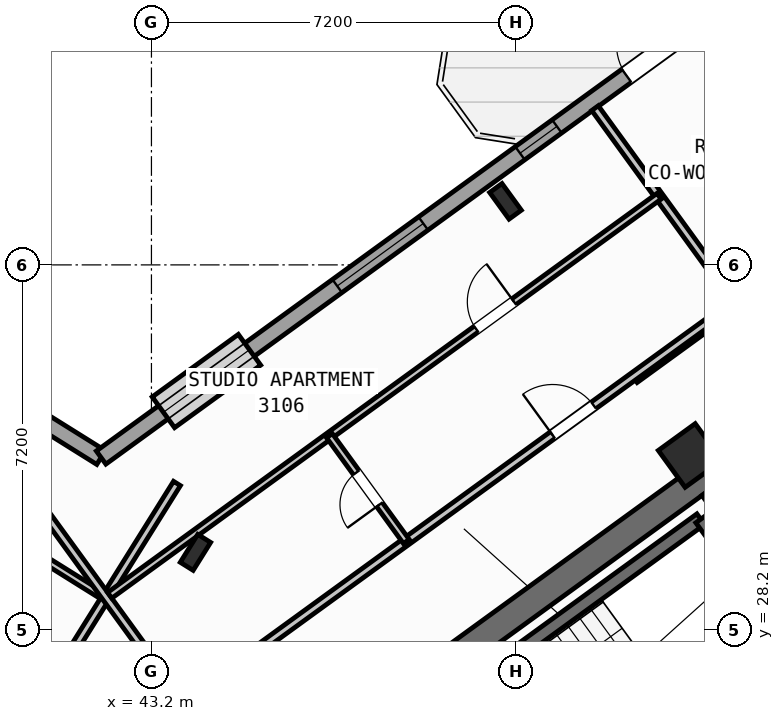
"""IFC4 building model, lengths in metres.
Left out: names, types, materials, properties, quantities, classifications, styles, units other than length and angle.
Written with IfcOpenShell. Run it as: python <this file> out.ifc"""

import sys

from ifc_helpers import new_model, si_unit, direction, frame, frame_2d, origin, origin_2d, place, context, subcontext, project, spatial, rectangle, hollow_rectangle, i_section, extrude, source, transform, mapped, element, fill, save


model = new_model("IFC4")
c1 = context("Model", 3, precision=1e-05, world=origin(), true_north=direction((0.0, 1.0)))
c2 = subcontext(c1, "Body", "Model", "MODEL_VIEW")
j1 = project(units=[si_unit("LENGTHUNIT", "METRE"), si_unit("PLANEANGLEUNIT", "RADIAN")], contexts=[c1])
p1 = place(None, origin())
s1 = spatial("IfcSite", under=j1, at=p1, CompositionType="ELEMENT")
p2 = place(p1, origin())
s2 = spatial("IfcBuilding", under=s1, at=p2, CompositionType="ELEMENT")
p3 = place(p2, frame((0.0, 0.0, 123.3)))
s3 = spatial("IfcBuildingStorey", under=s2, at=p3, CompositionType="ELEMENT", Elevation=123.3)
p4 = place(p3, frame((44.365, 24.142, 0.0), z_axis=(0.0, 0.0, 1.0), x_axis=(0.809024304885, 0.587775190107, 0.0)))
e1 = element("IfcWall", 1, at=p4, inside=s3, PredefinedType="SHEAR", context=c2, shape_type="SweptSolid", body=[
    extrude(rectangle(XDim=12.34, YDim=0.55, at=frame_2d((6.17, 0.0))), origin(), (0.0, 0.0, 1.0), 4.22),
])
p5 = place(p3, frame((58.064, 25.813, 0.0), z_axis=(0.0, 0.0, 1.0), x_axis=(-0.587764933797, 0.809031756236, 0.0)))
e2 = element("IfcWall", 2, at=p5, inside=s3, PredefinedType="SHEAR", context=c2, shape_type="SweptSolid", body=[
    extrude(rectangle(XDim=6.425, YDim=0.55, at=frame_2d((3.212, 0.0))), origin(), (0.0, 0.0, 1.0), 4.22),
])
m1 = source(origin(), c2, "Body", "SweptSolid", [
    extrude(i_section(OverallWidth=0.3, OverallDepth=0.65, WebThickness=0.016, FlangeThickness=0.031, at=origin_2d()), origin(), (0.0, 0.0, 1.0), 4.5),
])
p6 = place(p3, frame((44.068, 29.726, 0.0), z_axis=(0.0, 0.0, 1.0), x_axis=(-0.848048096156, 0.529919264233, 0.0)))
e3 = element("IfcColumn", 3, at=p6, inside=s3, PredefinedType="COLUMN", context=c2, shape_type="MappedRepresentation", body=[
    mapped(m1, transform((0.0, 0.0, 0.0), scale=1.0)),
])
m2 = source(origin(), c2, "Body", "SweptSolid", [
    extrude(hollow_rectangle(XDim=0.9, YDim=0.9, WallThickness=0.036, at=origin_2d()), origin(), (0.0, 0.0, 1.0), 4.5),
])
p7 = place(p3, frame((53.832, 31.638, 0.0), z_axis=(0.0, 0.0, 1.0), x_axis=(0.809016994375, 0.587785252292, 0.0)))
e4 = element("IfcColumn", 4, at=p7, inside=s3, PredefinedType="COLUMN", context=c2, shape_type="MappedRepresentation", body=[
    mapped(m2, transform((0.0, 0.0, 0.0), scale=1.0)),
])
p8 = place(p3, frame((50.188, 36.654, 0.0), z_axis=(0.0, 0.0, 1.0), x_axis=(0.809016994375, 0.587785252292, 0.0)))
e5 = element("IfcColumn", 5, at=p8, inside=s3, PredefinedType="COLUMN", context=c2, shape_type="MappedRepresentation", body=[
    mapped(m1, transform((0.0, 0.0, 0.0), scale=1.0)),
])
p9 = place(p3, frame((17.424, 47.083, 0.0), z_axis=(0.0, 0.0, 1.0), x_axis=(0.848049927979, -0.529916332693, 0.0)))
e6 = element("IfcWall", 6, at=p9, inside=s3, PredefinedType="STANDARD", context=c2, shape_type="SweptSolid", body=[
    extrude(rectangle(XDim=29.223, YDim=0.32, at=frame_2d((14.612, 0.0))), origin(), (0.0, 0.0, 1.0), 4.22),
])
p10 = place(p9, frame((8.839, 0.0, 0.0)))
e7 = element("IfcOpeningElement", 7, at=p10, cuts=e6, PredefinedType="OPENING", context=c2, shape_type="SweptSolid", body=[
    extrude(rectangle(XDim=1.05, YDim=2.15, at=frame_2d((0.525, 1.075))), frame((0.0, 0.17, 0.0), z_axis=(0.0, -1.0, 0.0), x_axis=(1.0, 0.0, 0.0)), (0.0, 0.0, 1.0), 0.34),
])
p11 = place(p9, frame((0.719, 0.0, 0.85)))
e8 = element("IfcOpeningElement", 8, at=p11, cuts=e6, PredefinedType="OPENING", context=c2, shape_type="SweptSolid", body=[
    extrude(rectangle(XDim=1.8, YDim=1.5, at=frame_2d((0.9, 0.75))), frame((0.0, 0.17, 0.0), z_axis=(0.0, -1.0, 0.0), x_axis=(1.0, 0.0, 0.0)), (0.0, 0.0, 1.0), 0.34),
])
p12 = place(p9, frame((3.981, 0.0, 0.85)))
e9 = element("IfcOpeningElement", 9, at=p12, cuts=e6, PredefinedType="OPENING", context=c2, shape_type="SweptSolid", body=[
    extrude(rectangle(XDim=1.5, YDim=1.5, at=frame_2d((0.75, 0.75))), frame((0.0, 0.17, 0.0), z_axis=(0.0, -1.0, 0.0), x_axis=(1.0, 0.0, 0.0)), (0.0, 0.0, 1.0), 0.34),
])
p13 = place(p9, frame((7.021, 0.0, 0.95)))
e10 = element("IfcOpeningElement", 10, at=p13, cuts=e6, PredefinedType="OPENING", context=c2, shape_type="SweptSolid", body=[
    extrude(rectangle(XDim=1.2, YDim=1.4, at=frame_2d((0.6, 0.7))), frame((0.0, 0.17, 0.0), z_axis=(0.0, -1.0, 0.0), x_axis=(1.0, 0.0, 0.0)), (0.0, 0.0, 1.0), 0.34),
])
p14 = place(p9, frame((14.471, 0.0, 0.95)))
e11 = element("IfcOpeningElement", 11, at=p14, cuts=e6, PredefinedType="OPENING", context=c2, shape_type="SweptSolid", body=[
    extrude(rectangle(XDim=1.2, YDim=1.4, at=frame_2d((0.6, 0.7))), frame((0.0, 0.17, 0.0), z_axis=(0.0, -1.0, 0.0), x_axis=(1.0, 0.0, 0.0)), (0.0, 0.0, 1.0), 0.34),
])
p15 = place(p9, frame((17.254, 0.0, 1.0)))
e12 = element("IfcOpeningElement", 12, at=p15, cuts=e6, PredefinedType="OPENING", context=c2, shape_type="SweptSolid", body=[
    extrude(rectangle(XDim=0.9, YDim=1.25, at=frame_2d((0.45, 0.625))), frame((0.0, 0.17, 0.0), z_axis=(0.0, -1.0, 0.0), x_axis=(1.0, 0.0, 0.0)), (0.0, 0.0, 1.0), 0.34),
])
p16 = place(p9, frame((20.764, 0.0, 0.8)))
e13 = element("IfcOpeningElement", 13, at=p16, cuts=e6, PredefinedType="OPENING", context=c2, shape_type="SweptSolid", body=[
    extrude(rectangle(XDim=2.1, YDim=1.55, at=frame_2d((1.05, 0.775))), frame((0.0, 0.17, 0.0), z_axis=(0.0, -1.0, 0.0), x_axis=(1.0, 0.0, 0.0)), (0.0, 0.0, 1.0), 0.34),
])
p17 = place(p9, frame((25.403, 0.0, 0.8)))
e14 = element("IfcOpeningElement", 14, at=p17, cuts=e6, PredefinedType="OPENING", context=c2, shape_type="SweptSolid", body=[
    extrude(rectangle(XDim=2.1, YDim=1.55, at=frame_2d((1.05, 0.775))), frame((0.0, 0.17, 0.0), z_axis=(0.0, -1.0, 0.0), x_axis=(1.0, 0.0, 0.0)), (0.0, 0.0, 1.0), 0.34),
])
p18 = place(p3, frame((42.207, 31.597, 0.0), z_axis=(0.0, 0.0, 1.0), x_axis=(0.809020333377, 0.587780656523, 0.0)))
e15 = element("IfcWall", 15, at=p18, inside=s3, PredefinedType="STANDARD", context=c2, shape_type="SweptSolid", body=[
    extrude(rectangle(XDim=15.223, YDim=0.32, at=frame_2d((7.611, 0.0))), origin(), (0.0, 0.0, 1.0), 4.22),
])
p19 = place(p18, frame((12.82, 0.0, 0.0)))
e16 = element("IfcOpeningElement", 16, at=p19, cuts=e15, PredefinedType="OPENING", context=c2, shape_type="SweptSolid", body=[
    extrude(rectangle(XDim=1.05, YDim=2.15, at=frame_2d((0.525, 1.075))), frame((0.0, 0.17, 0.0), z_axis=(0.0, -1.0, 0.0), x_axis=(1.0, 0.0, 0.0)), (0.0, 0.0, 1.0), 0.34),
])
p20 = place(p18, frame((1.52, 0.0, 0.8)))
e17 = element("IfcOpeningElement", 17, at=p20, cuts=e15, PredefinedType="OPENING", context=c2, shape_type="SweptSolid", body=[
    extrude(rectangle(XDim=2.1, YDim=1.55, at=frame_2d((1.05, 0.775))), frame((0.0, 0.17, 0.0), z_axis=(0.0, -1.0, 0.0), x_axis=(1.0, 0.0, 0.0)), (0.0, 0.0, 1.0), 0.34),
])
p21 = place(p18, frame((5.76, 0.0, 0.8)))
e18 = element("IfcOpeningElement", 18, at=p21, cuts=e15, PredefinedType="OPENING", context=c2, shape_type="SweptSolid", body=[
    extrude(rectangle(XDim=2.1, YDim=1.55, at=frame_2d((1.05, 0.775))), frame((0.0, 0.17, 0.0), z_axis=(0.0, -1.0, 0.0), x_axis=(1.0, 0.0, 0.0)), (0.0, 0.0, 1.0), 0.34),
])
p22 = place(p18, frame((10.219, 0.0, 1.0)))
e19 = element("IfcOpeningElement", 19, at=p22, cuts=e15, PredefinedType="OPENING", context=c2, shape_type="SweptSolid", body=[
    extrude(rectangle(XDim=0.9, YDim=1.25, at=frame_2d((0.45, 0.625))), frame((0.0, 0.17, 0.0), z_axis=(0.0, -1.0, 0.0), x_axis=(1.0, 0.0, 0.0)), (0.0, 0.0, 1.0), 0.34),
])
p23 = place(p3, frame((48.006, 25.996, 0.0), z_axis=(0.0, 0.0, 1.0), x_axis=(0.80901903764, 0.587782439969, 0.0)))
e20 = element("IfcWall", 20, at=p23, inside=s3, PredefinedType="SHEAR", context=c2, shape_type="SweptSolid", body=[
    extrude(rectangle(XDim=7.46, YDim=0.26, at=frame_2d((3.73, 0.0))), origin(), (0.0, 0.0, 1.0), 4.22),
])
p24 = place(p3, frame((55.906, 27.831, 0.0), z_axis=(0.0, 0.0, 1.0), x_axis=(-0.587804123638, 0.809003283204, 0.0)))
e21 = element("IfcWall", 21, at=p24, inside=s3, PredefinedType="SHEAR", context=c2, shape_type="SweptSolid", body=[
    extrude(rectangle(XDim=3.16, YDim=0.26, at=frame_2d((1.58, 0.0))), origin(), (0.0, 0.0, 1.0), 4.22),
])
p25 = place(p3, frame((41.936, 26.012, 0.0), z_axis=(0.0, 0.0, 1.0), x_axis=(-0.848051154596, 0.529914369676, 0.0)))
e22 = element("IfcWall", 22, at=p25, inside=s3, PredefinedType="PARTITIONING", context=c2, shape_type="SweptSolid", body=[
    extrude(rectangle(XDim=15.57, YDim=0.16, at=frame_2d((7.785, 0.0))), origin(), (0.0, 0.0, 1.0), 4.21),
])
p26 = place(p25, frame((10.83, 0.0, 0.0)))
e23 = element("IfcOpeningElement", 23, at=p26, cuts=e22, PredefinedType="OPENING", context=c2, shape_type="SweptSolid", body=[
    extrude(rectangle(XDim=1.0, YDim=2.1, at=frame_2d((0.5, 1.05))), frame((0.0, 0.09, 0.0), z_axis=(0.0, -1.0, 0.0), x_axis=(1.0, 0.0, 0.0)), (0.0, 0.0, 1.0), 0.18),
])
p27 = place(p3, frame((43.704, 31.086, 0.0), z_axis=(0.0, 0.0, 1.0), x_axis=(-0.529906828443, -0.848055866774, 0.0)))
e24 = element("IfcWall", 24, at=p27, inside=s3, PredefinedType="PARTITIONING", context=c2, shape_type="SweptSolid", body=[
    extrude(rectangle(XDim=5.48, YDim=0.16, at=frame_2d((2.74, 0.0))), origin(), (0.0, 0.0, 1.0), 4.21),
])
p28 = place(p3, frame((42.226, 28.873, 0.0), z_axis=(0.0, 0.0, 1.0), x_axis=(-0.848049134363, 0.529917602752, 0.0)))
e25 = element("IfcWall", 25, at=p28, inside=s3, PredefinedType="PLUMBINGWALL", context=c2, shape_type="SweptSolid", body=[
    extrude(rectangle(XDim=14.3, YDim=0.14, at=frame_2d((7.15, 0.0))), origin(), (0.0, 0.0, 1.0), 4.21),
])
p29 = place(p28, frame((9.57, 0.0, 0.0)))
e26 = element("IfcOpeningElement", 26, at=p29, cuts=e25, PredefinedType="OPENING", context=c2, shape_type="SweptSolid", body=[
    extrude(rectangle(XDim=0.92, YDim=2.08, at=frame_2d((0.46, 1.04))), frame((0.0, 0.08, 0.0), z_axis=(0.0, -1.0, 0.0), x_axis=(1.0, 0.0, 0.0)), (0.0, 0.0, 1.0), 0.16),
])
p30 = place(p3, frame((52.739, 33.143, 0.0), z_axis=(0.0, 0.0, 1.0), x_axis=(0.809000999347, 0.58780726693, 0.0)))
e27 = element("IfcWall", 27, at=p30, inside=s3, PredefinedType="PARTITIONING", context=c2, shape_type="SweptSolid", body=[
    extrude(rectangle(XDim=2.51, YDim=0.16, at=frame_2d((1.255, 0.0))), origin(), (0.0, 0.0, 1.0), 4.21),
])
p31 = place(p3, frame((60.829, 26.278, 0.0), z_axis=(0.0, 0.0, 1.0), x_axis=(-0.587777474174, 0.809022645451, 0.0)))
e28 = element("IfcWall", 28, at=p31, inside=s3, PredefinedType="PARTITIONING", context=c2, shape_type="SweptSolid", body=[
    extrude(rectangle(XDim=15.1, YDim=0.16, at=frame_2d((7.55, 0.0))), origin(), (0.0, 0.0, 1.0), 4.21),
])
p32 = place(p3, frame((42.866, 26.044, 0.0), z_axis=(0.0, 0.0, 1.0), x_axis=(0.809020254154, 0.587780765566, 0.0)))
e29 = element("IfcWall", 29, at=p32, inside=s3, PredefinedType="PARTITIONING", context=c2, shape_type="SweptSolid", body=[
    extrude(rectangle(XDim=14.67, YDim=0.16, at=frame_2d((7.335, 0.0))), origin(), (0.0, 0.0, 1.0), 4.21),
])
p33 = place(p32, frame((10.2, 0.0, 0.0)))
e30 = element("IfcOpeningElement", 30, at=p33, cuts=e29, PredefinedType="OPENING", context=c2, shape_type="SweptSolid", body=[
    extrude(rectangle(XDim=1.0, YDim=2.1, at=frame_2d((0.5, 1.05))), frame((0.0, 0.09, 0.0), z_axis=(0.0, -1.0, 0.0), x_axis=(1.0, 0.0, 0.0)), (0.0, 0.0, 1.0), 0.18),
])
p34 = place(p3, frame((43.969, 26.55, 0.0), z_axis=(0.0, 0.0, 1.0), x_axis=(-0.587776919386, 0.80902304852, 0.0)))
e31 = element("IfcWall", 31, at=p34, inside=s3, PredefinedType="PARTITIONING", context=c2, shape_type="SweptSolid", body=[
    extrude(rectangle(XDim=5.48, YDim=0.16, at=frame_2d((2.74, 0.0))), origin(), (0.0, 0.0, 1.0), 4.21),
])
p35 = place(p3, frame((42.377, 28.878, 0.0), z_axis=(0.0, 0.0, 1.0), x_axis=(0.809020411523, 0.587780548963, 0.0)))
e32 = element("IfcWall", 32, at=p35, inside=s3, PredefinedType="PLUMBINGWALL", context=c2, shape_type="SweptSolid", body=[
    extrude(rectangle(XDim=13.4, YDim=0.14, at=frame_2d((6.7, 0.0))), origin(), (0.0, 0.0, 1.0), 4.21),
])
p36 = place(p35, frame((8.94, 0.0, 0.0)))
e33 = element("IfcOpeningElement", 33, at=p36, cuts=e32, PredefinedType="OPENING", context=c2, shape_type="SweptSolid", body=[
    extrude(rectangle(XDim=0.92, YDim=2.08, at=frame_2d((0.46, 1.04))), frame((0.0, 0.08, 0.0), z_axis=(0.0, -1.0, 0.0), x_axis=(1.0, 0.0, 0.0)), (0.0, 0.0, 1.0), 0.16),
])
p37 = place(p3, frame((48.229, 29.941, 0.0), z_axis=(0.0, 0.0, 1.0), x_axis=(-0.587772116736, 0.809026537752, 0.0)))
e34 = element("IfcWall", 34, at=p37, inside=s3, PredefinedType="PLUMBINGWALL", context=c2, shape_type="SweptSolid", body=[
    extrude(rectangle(XDim=2.58, YDim=0.14, at=frame_2d((1.29, 0.0))), origin(), (0.0, 0.0, 1.0), 4.21),
])
p38 = place(p37, frame((0.9, 0.0, 0.0)))
e35 = element("IfcOpeningElement", 35, at=p38, cuts=e34, PredefinedType="OPENING", context=c2, shape_type="SweptSolid", body=[
    extrude(rectangle(XDim=0.78, YDim=2.05, at=frame_2d((0.39, 1.025))), frame((0.0, 0.08, 0.0), z_axis=(0.0, -1.0, 0.0), x_axis=(1.0, 0.0, 0.0)), (0.0, 0.0, 1.0), 0.16),
])
m3 = source(origin(), c2, "Body", "SweptSolid", [
    extrude(rectangle(XDim=1.05, YDim=2.15, at=frame_2d((0.525, 1.075))), frame((0.0, 0.025, 0.0), z_axis=(0.0, -1.0, 0.0), x_axis=(1.0, 0.0, 0.0)), (0.0, 0.0, 1.0), 0.05),
])
p39 = place(p19, origin())
e36 = element("IfcDoor", 36, at=p39, inside=s3, OperationType="SINGLE_SWING_RIGHT", PredefinedType="DOOR", context=c2, shape_type="MappedRepresentation", body=[
    mapped(m3, transform((0.0, 0.0, 0.0), scale=1.0)),
])
fill(e16, e36)
m4 = source(origin(), c2, "Body", "SweptSolid", [
    extrude(rectangle(XDim=2.1, YDim=1.55, at=frame_2d((1.05, 0.775))), frame((0.0, 0.03, 0.0), z_axis=(0.0, -1.0, 0.0), x_axis=(1.0, 0.0, 0.0)), (0.0, 0.0, 1.0), 0.06),
])
p40 = place(p20, origin())
e37 = element("IfcWindow", 37, at=p40, inside=s3, PartitioningType="SINGLE_PANEL", PredefinedType="WINDOW", context=c2, shape_type="MappedRepresentation", body=[
    mapped(m4, transform((0.0, 0.0, 0.0), scale=1.0)),
])
fill(e17, e37)
p41 = place(p21, origin())
e38 = element("IfcWindow", 38, at=p41, inside=s3, PartitioningType="SINGLE_PANEL", PredefinedType="WINDOW", context=c2, shape_type="MappedRepresentation", body=[
    mapped(m4, transform((0.0, 0.0, 0.0), scale=1.0)),
])
fill(e18, e38)
m5 = source(origin(), c2, "Body", "SweptSolid", [
    extrude(rectangle(XDim=0.9, YDim=1.25, at=frame_2d((0.45, 0.625))), frame((0.0, 0.03, 0.0), z_axis=(0.0, -1.0, 0.0), x_axis=(1.0, 0.0, 0.0)), (0.0, 0.0, 1.0), 0.06),
])
p42 = place(p22, origin())
e39 = element("IfcWindow", 39, at=p42, inside=s3, PartitioningType="SINGLE_PANEL", PredefinedType="WINDOW", context=c2, shape_type="MappedRepresentation", body=[
    mapped(m5, transform((0.0, 0.0, 0.0), scale=1.0)),
])
fill(e19, e39)
m6 = source(origin(), c2, "Body", "SweptSolid", [
    extrude(rectangle(XDim=1.0, YDim=2.1, at=frame_2d((0.5, 1.05))), frame((0.0, 0.025, 0.0), z_axis=(0.0, -1.0, 0.0), x_axis=(1.0, 0.0, 0.0)), (0.0, 0.0, 1.0), 0.05),
])
p43 = place(p33, origin())
e40 = element("IfcDoor", 40, at=p43, inside=s3, OperationType="SINGLE_SWING_LEFT", PredefinedType="DOOR", context=c2, shape_type="MappedRepresentation", body=[
    mapped(m6, transform((0.0, 0.0, 0.0), scale=1.0)),
])
fill(e30, e40)
m7 = source(origin(), c2, "Body", "SweptSolid", [
    extrude(rectangle(XDim=0.92, YDim=2.08, at=frame_2d((0.46, 1.04))), frame((0.0, 0.025, 0.0), z_axis=(0.0, -1.0, 0.0), x_axis=(1.0, 0.0, 0.0)), (0.0, 0.0, 1.0), 0.05),
])
p44 = place(p36, origin())
e41 = element("IfcDoor", 41, at=p44, inside=s3, OperationType="SINGLE_SWING_RIGHT", PredefinedType="DOOR", context=c2, shape_type="MappedRepresentation", body=[
    mapped(m7, transform((0.0, 0.0, 0.0), scale=1.0)),
])
fill(e33, e41)
m8 = source(origin(), c2, "Body", "SweptSolid", [
    extrude(rectangle(XDim=0.78, YDim=2.05, at=frame_2d((0.39, 1.025))), frame((0.0, 0.025, 0.0), z_axis=(0.0, -1.0, 0.0), x_axis=(1.0, 0.0, 0.0)), (0.0, 0.0, 1.0), 0.05),
])
p45 = place(p38, origin())
e42 = element("IfcDoor", 42, at=p45, inside=s3, OperationType="SINGLE_SWING_LEFT", PredefinedType="DOOR", context=c2, shape_type="MappedRepresentation", body=[
    mapped(m8, transform((0.0, 0.0, 0.0), scale=1.0)),
])
fill(e35, e42)
save(model, sys.argv[1])
